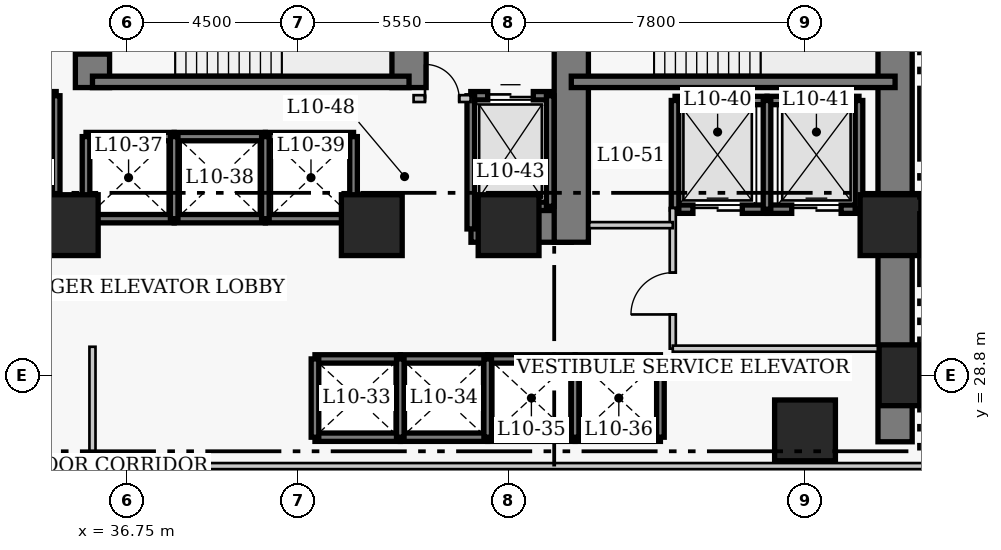
"""IFC4 building model, lengths in metres.
Left out: names, types, materials, properties, quantities, classifications, styles, units other than length and angle.
Written with IfcOpenShell. Run it as: python <this file> out.ifc"""

import sys

from ifc_helpers import new_model, si_unit, direction, frame, frame_2d, origin, origin_2d, place, context, subcontext, project, spatial, rectangle, extrude, element, fill, save


model = new_model("IFC4")
c1 = context("Model", 3, precision=1e-05, world=origin(), true_north=direction((0.0, 1.0)))
c2 = subcontext(c1, "Body", "Model", "MODEL_VIEW")
j1 = project(units=[si_unit("LENGTHUNIT", "METRE"), si_unit("PLANEANGLEUNIT", "RADIAN")], contexts=[c1])
p1 = place(None, origin())
s1 = spatial("IfcSite", under=j1, at=p1, CompositionType="ELEMENT")
p2 = place(p1, origin())
s2 = spatial("IfcBuilding", under=s1, at=p2, CompositionType="ELEMENT")
p3 = place(p2, frame((0.0, 0.0, 45.0)))
s3 = spatial("IfcBuildingStorey", under=s2, at=p3, CompositionType="ELEMENT", Elevation=45.0)
p4 = place(p3, frame((56.97, 27.05, 0.0), z_axis=(0.0, 0.0, 1.0), x_axis=(0.0, 1.0, 0.0)))
e1 = element("IfcWall", 1, at=p4, inside=s3, PredefinedType="SHEAR", context=c2, shape_type="SweptSolid", body=[
    extrude(rectangle(XDim=13.72, YDim=0.9, at=frame_2d((6.86, 0.0))), origin(), (0.0, 0.0, 1.0), 3.8),
])
p5 = place(p3, frame((45.81, 32.75, 0.0), z_axis=(0.0, 0.0, 1.0), x_axis=(1.0, 0.0, 0.0)))
e2 = element("IfcWall", 2, at=p5, inside=s3, PredefinedType="SHEAR", context=c2, shape_type="SweptSolid", body=[
    extrude(rectangle(XDim=2.64, YDim=0.9, at=frame_2d((1.32, 0.0))), origin(), (0.0, 0.0, 1.0), 3.8),
])
p6 = place(p3, frame((35.85, 36.37, 0.0), z_axis=(0.0, 0.0, 1.0), x_axis=(0.0, 1.0, 0.0)))
e3 = element("IfcWall", 3, at=p6, inside=s3, PredefinedType="SHEAR", context=c2, shape_type="SweptSolid", body=[
    extrude(rectangle(XDim=3.95, YDim=0.9, at=frame_2d((1.975, 0.0))), origin(), (0.0, 0.0, 1.0), 3.8),
])
p7 = place(p6, frame((0.88, 0.0, 0.0)))
e4 = element("IfcOpeningElement", 4, at=p7, cuts=e3, PredefinedType="OPENING", context=c2, shape_type="SweptSolid", body=[
    extrude(rectangle(XDim=1.1, YDim=2.15, at=frame_2d((0.55, 1.075))), frame((0.0, 0.46, 0.0), z_axis=(0.0, -1.0, 0.0), x_axis=(1.0, 0.0, 0.0)), (0.0, 0.0, 1.0), 0.92),
])
p8 = place(p3, frame((44.18, 36.37, 0.0), z_axis=(0.0, 0.0, 1.0), x_axis=(0.0, 1.0, 0.0)))
e5 = element("IfcWall", 5, at=p8, inside=s3, PredefinedType="SHEAR", context=c2, shape_type="SweptSolid", body=[
    extrude(rectangle(XDim=3.95, YDim=0.9, at=frame_2d((1.975, 0.0))), origin(), (0.0, 0.0, 1.0), 3.8),
])
p9 = place(p3, frame((48.45, 32.3, 0.0), z_axis=(0.0, 0.0, 1.0), x_axis=(0.0, 1.0, 0.0)))
e6 = element("IfcWall", 6, at=p9, inside=s3, PredefinedType="SHEAR", context=c2, shape_type="SweptSolid", body=[
    extrude(rectangle(XDim=8.02, YDim=0.9, at=frame_2d((4.01, 0.0))), origin(), (0.0, 0.0, 1.0), 3.8),
])
p10 = place(p9, frame((5.9, 0.0, 0.0)))
e7 = element("IfcOpeningElement", 7, at=p10, cuts=e6, PredefinedType="OPENING", context=c2, shape_type="SweptSolid", body=[
    extrude(rectangle(XDim=1.1, YDim=2.15, at=frame_2d((0.55, 1.075))), frame((0.0, 0.46, 0.0), z_axis=(0.0, -1.0, 0.0), x_axis=(1.0, 0.0, 0.0)), (0.0, 0.0, 1.0), 0.92),
])
p11 = place(p3, frame((35.85, 36.52, 0.0), z_axis=(0.0, 0.0, 1.0), x_axis=(1.0, 0.0, 0.0)))
e8 = element("IfcWall", 8, at=p11, inside=s3, PredefinedType="SHEAR", context=c2, shape_type="SweptSolid", body=[
    extrude(rectangle(XDim=8.33, YDim=0.3, at=frame_2d((4.165, 0.0))), origin(), (0.0, 0.0, 1.0), 3.8),
])
p12 = place(p3, frame((48.45, 36.52, 0.0), z_axis=(0.0, 0.0, 1.0), x_axis=(1.0, 0.0, 0.0)))
e9 = element("IfcWall", 9, at=p12, inside=s3, PredefinedType="SHEAR", context=c2, shape_type="SweptSolid", body=[
    extrude(rectangle(XDim=8.52, YDim=0.3, at=frame_2d((4.26, 0.0))), origin(), (0.0, 0.0, 1.0), 3.8),
])
for number, where, z_axis, x_axis in (
    (10, (57.35, 28.8, 0.0), (0.0, 0.0, 1.0), (1.0, 0.0, 0.0)),
    (11, (35.2, 32.75, 0.0), (0.0, 0.0, 1.0), (1.0, 0.0, 0.0)),
    (12, (43.2, 32.75, 0.0), (0.0, 0.0, 1.0), (1.0, 0.0, 0.0)),
    (13, (46.8, 32.75, 0.0), (0.0, 0.0, 1.0), (1.0, 0.0, 0.0)),
    (14, (54.6, 27.35, 0.0), (0.0, 0.0, 1.0), (1.0, 0.0, 0.0)),
    (15, (56.85, 32.75, 0.0), (0.0, 0.0, 1.0), (1.0, 0.0, 0.0)),
):
    element("IfcColumn", number, at=place(p3, frame(where, z_axis=z_axis, x_axis=x_axis)), inside=s3, PredefinedType="COLUMN", context=c2, shape_type="SweptSolid", body=[
        extrude(rectangle(XDim=1.6, YDim=1.6, at=origin_2d()), origin(), (0.0, 0.0, 1.0), 3.8),
    ])
for number, where, z_axis, x_axis in (
    (16, (41.705, 29.23, 0.0), (0.0, 0.0, 1.0), (1.0, 0.0, 0.0)),
    (17, (41.705, 27.17, 0.0), (0.0, 0.0, 1.0), (1.0, 0.0, 0.0)),
):
    element("IfcWall", number, at=place(p3, frame(where, z_axis=z_axis, x_axis=x_axis)), inside=s3, PredefinedType="SHEAR", context=c2, shape_type="SweptSolid", body=[
        extrude(rectangle(XDim=2.245, YDim=0.22, at=frame_2d((1.123, 0.0))), origin(), (0.0, 0.0, 1.0), 3.8),
    ])
p13 = place(p3, frame((41.705, 27.17, 0.0), z_axis=(0.0, 0.0, 1.0), x_axis=(0.0, 1.0, 0.0)))
e18 = element("IfcWall", 18, at=p13, inside=s3, PredefinedType="SHEAR", context=c2, shape_type="SweptSolid", body=[
    extrude(rectangle(XDim=2.06, YDim=0.2, at=frame_2d((1.03, 0.0))), origin(), (0.0, 0.0, 1.0), 3.8),
])
for number, where, z_axis, x_axis in (
    (19, (43.95, 29.23, 0.0), (0.0, 0.0, 1.0), (1.0, 0.0, 0.0)),
    (20, (43.95, 27.17, 0.0), (0.0, 0.0, 1.0), (1.0, 0.0, 0.0)),
):
    element("IfcWall", number, at=place(p3, frame(where, z_axis=z_axis, x_axis=x_axis)), inside=s3, PredefinedType="SHEAR", context=c2, shape_type="SweptSolid", body=[
        extrude(rectangle(XDim=2.3, YDim=0.22, at=frame_2d((1.15, 0.0))), origin(), (0.0, 0.0, 1.0), 3.8),
    ])
p14 = place(p3, frame((43.95, 27.17, 0.0), z_axis=(0.0, 0.0, 1.0), x_axis=(0.0, 1.0, 0.0)))
e21 = element("IfcWall", 21, at=p14, inside=s3, PredefinedType="SHEAR", context=c2, shape_type="SweptSolid", body=[
    extrude(rectangle(XDim=2.06, YDim=0.2, at=frame_2d((1.03, 0.0))), origin(), (0.0, 0.0, 1.0), 3.8),
])
for number, where, z_axis, x_axis in (
    (22, (46.25, 29.23, 0.0), (0.0, 0.0, 1.0), (1.0, 0.0, 0.0)),
    (23, (46.25, 27.17, 0.0), (0.0, 0.0, 1.0), (1.0, 0.0, 0.0)),
):
    element("IfcWall", number, at=place(p3, frame(where, z_axis=z_axis, x_axis=x_axis)), inside=s3, PredefinedType="SHEAR", context=c2, shape_type="SweptSolid", body=[
        extrude(rectangle(XDim=2.3, YDim=0.22, at=frame_2d((1.15, 0.0))), origin(), (0.0, 0.0, 1.0), 3.8),
    ])
p15 = place(p3, frame((46.25, 27.17, 0.0), z_axis=(0.0, 0.0, 1.0), x_axis=(0.0, 1.0, 0.0)))
e24 = element("IfcWall", 24, at=p15, inside=s3, PredefinedType="SHEAR", context=c2, shape_type="SweptSolid", body=[
    extrude(rectangle(XDim=2.06, YDim=0.2, at=frame_2d((1.03, 0.0))), origin(), (0.0, 0.0, 1.0), 3.8),
])
for number, where, z_axis, x_axis in (
    (25, (48.55, 29.23, 0.0), (0.0, 0.0, 1.0), (1.0, 0.0, 0.0)),
    (26, (48.55, 27.17, 0.0), (0.0, 0.0, 1.0), (1.0, 0.0, 0.0)),
):
    element("IfcWall", number, at=place(p3, frame(where, z_axis=z_axis, x_axis=x_axis)), inside=s3, PredefinedType="SHEAR", context=c2, shape_type="SweptSolid", body=[
        extrude(rectangle(XDim=2.245, YDim=0.22, at=frame_2d((1.123, 0.0))), origin(), (0.0, 0.0, 1.0), 3.8),
    ])
for number, where, z_axis, x_axis in (
    (27, (48.55, 27.17, 0.0), (0.0, 0.0, 1.0), (0.0, 1.0, 0.0)),
    (28, (50.795, 27.17, 0.0), (0.0, 0.0, 1.0), (0.0, 1.0, 0.0)),
):
    element("IfcWall", number, at=place(p3, frame(where, z_axis=z_axis, x_axis=x_axis)), inside=s3, PredefinedType="SHEAR", context=c2, shape_type="SweptSolid", body=[
        extrude(rectangle(XDim=2.06, YDim=0.2, at=frame_2d((1.03, 0.0))), origin(), (0.0, 0.0, 1.0), 3.8),
    ])
for number, where, z_axis, x_axis in (
    (29, (35.68, 35.08, 0.0), (0.0, 0.0, 1.0), (1.0, 0.0, 0.0)),
    (30, (35.68, 32.92, 0.0), (0.0, 0.0, 1.0), (1.0, 0.0, 0.0)),
):
    element("IfcWall", number, at=place(p3, frame(where, z_axis=z_axis, x_axis=x_axis)), inside=s3, PredefinedType="SHEAR", context=c2, shape_type="SweptSolid", body=[
        extrude(rectangle(XDim=2.32, YDim=0.22, at=frame_2d((1.16, 0.0))), origin(), (0.0, 0.0, 1.0), 3.8),
    ])
p16 = place(p3, frame((35.68, 32.92, 0.0), z_axis=(0.0, 0.0, 1.0), x_axis=(0.0, 1.0, 0.0)))
e31 = element("IfcWall", 31, at=p16, inside=s3, PredefinedType="SHEAR", context=c2, shape_type="SweptSolid", body=[
    extrude(rectangle(XDim=2.16, YDim=0.2, at=frame_2d((1.08, 0.0))), origin(), (0.0, 0.0, 1.0), 3.8),
])
for number, where, z_axis, x_axis in (
    (32, (38.0, 35.08, 0.0), (0.0, 0.0, 1.0), (1.0, 0.0, 0.0)),
    (33, (38.0, 32.92, 0.0), (0.0, 0.0, 1.0), (1.0, 0.0, 0.0)),
):
    element("IfcWall", number, at=place(p3, frame(where, z_axis=z_axis, x_axis=x_axis)), inside=s3, PredefinedType="SHEAR", context=c2, shape_type="SweptSolid", body=[
        extrude(rectangle(XDim=2.4, YDim=0.22, at=frame_2d((1.2, 0.0))), origin(), (0.0, 0.0, 1.0), 3.8),
    ])
p17 = place(p3, frame((38.0, 32.92, 0.0), z_axis=(0.0, 0.0, 1.0), x_axis=(0.0, 1.0, 0.0)))
e34 = element("IfcWall", 34, at=p17, inside=s3, PredefinedType="SHEAR", context=c2, shape_type="SweptSolid", body=[
    extrude(rectangle(XDim=2.16, YDim=0.2, at=frame_2d((1.08, 0.0))), origin(), (0.0, 0.0, 1.0), 3.8),
])
for number, where, z_axis, x_axis in (
    (35, (40.4, 35.08, 0.0), (0.0, 0.0, 1.0), (1.0, 0.0, 0.0)),
    (36, (40.4, 32.92, 0.0), (0.0, 0.0, 1.0), (1.0, 0.0, 0.0)),
):
    element("IfcWall", number, at=place(p3, frame(where, z_axis=z_axis, x_axis=x_axis)), inside=s3, PredefinedType="SHEAR", context=c2, shape_type="SweptSolid", body=[
        extrude(rectangle(XDim=2.32, YDim=0.22, at=frame_2d((1.16, 0.0))), origin(), (0.0, 0.0, 1.0), 3.8),
    ])
for number, where, z_axis, x_axis in (
    (37, (40.4, 32.92, 0.0), (0.0, 0.0, 1.0), (0.0, 1.0, 0.0)),
    (38, (42.72, 32.92, 0.0), (0.0, 0.0, 1.0), (0.0, 1.0, 0.0)),
):
    element("IfcWall", number, at=place(p3, frame(where, z_axis=z_axis, x_axis=x_axis)), inside=s3, PredefinedType="SHEAR", context=c2, shape_type="SweptSolid", body=[
        extrude(rectangle(XDim=2.16, YDim=0.2, at=frame_2d((1.08, 0.0))), origin(), (0.0, 0.0, 1.0), 3.8),
    ])
p18 = place(p3, frame((51.18, 36.03, 0.0), z_axis=(0.0, 0.0, 1.0), x_axis=(1.0, 0.0, 0.0)))
e39 = element("IfcWall", 39, at=p18, inside=s3, PredefinedType="SHEAR", context=c2, shape_type="SweptSolid", body=[
    extrude(rectangle(XDim=2.42, YDim=0.22, at=frame_2d((1.21, 0.0))), origin(), (0.0, 0.0, 1.0), 3.8),
])
p19 = place(p3, frame((51.18, 33.17, 0.0), z_axis=(0.0, 0.0, 1.0), x_axis=(1.0, 0.0, 0.0)))
e40 = element("IfcWall", 40, at=p19, inside=s3, PredefinedType="SHEAR", context=c2, shape_type="SweptSolid", body=[
    extrude(rectangle(XDim=2.42, YDim=0.22, at=frame_2d((1.21, 0.0))), origin(), (0.0, 0.0, 1.0), 3.8),
])
p20 = place(p19, frame((0.47, 0.0, 0.0)))
e41 = element("IfcOpeningElement", 41, at=p20, cuts=e40, PredefinedType="OPENING", context=c2, shape_type="SweptSolid", body=[
    extrude(rectangle(XDim=1.3, YDim=2.15, at=frame_2d((0.65, 1.075))), frame((0.0, 0.12, 0.0), z_axis=(0.0, -1.0, 0.0), x_axis=(1.0, 0.0, 0.0)), (0.0, 0.0, 1.0), 0.24),
])
p21 = place(p3, frame((51.18, 33.17, 0.0), z_axis=(0.0, 0.0, 1.0), x_axis=(0.0, 1.0, 0.0)))
e42 = element("IfcWall", 42, at=p21, inside=s3, PredefinedType="SHEAR", context=c2, shape_type="SweptSolid", body=[
    extrude(rectangle(XDim=2.86, YDim=0.2, at=frame_2d((1.43, 0.0))), origin(), (0.0, 0.0, 1.0), 3.8),
])
p22 = place(p3, frame((53.6, 36.03, 0.0), z_axis=(0.0, 0.0, 1.0), x_axis=(1.0, 0.0, 0.0)))
e43 = element("IfcWall", 43, at=p22, inside=s3, PredefinedType="SHEAR", context=c2, shape_type="SweptSolid", body=[
    extrude(rectangle(XDim=2.42, YDim=0.22, at=frame_2d((1.21, 0.0))), origin(), (0.0, 0.0, 1.0), 3.8),
])
p23 = place(p3, frame((53.6, 33.17, 0.0), z_axis=(0.0, 0.0, 1.0), x_axis=(1.0, 0.0, 0.0)))
e44 = element("IfcWall", 44, at=p23, inside=s3, PredefinedType="SHEAR", context=c2, shape_type="SweptSolid", body=[
    extrude(rectangle(XDim=2.42, YDim=0.22, at=frame_2d((1.21, 0.0))), origin(), (0.0, 0.0, 1.0), 3.8),
])
p24 = place(p23, frame((0.65, 0.0, 0.0)))
e45 = element("IfcOpeningElement", 45, at=p24, cuts=e44, PredefinedType="OPENING", context=c2, shape_type="SweptSolid", body=[
    extrude(rectangle(XDim=1.3, YDim=2.15, at=frame_2d((0.65, 1.075))), frame((0.0, 0.12, 0.0), z_axis=(0.0, -1.0, 0.0), x_axis=(1.0, 0.0, 0.0)), (0.0, 0.0, 1.0), 0.24),
])
for number, where, z_axis, x_axis in (
    (46, (53.6, 33.17, 0.0), (0.0, 0.0, 1.0), (0.0, 1.0, 0.0)),
    (47, (56.02, 33.17, 0.0), (0.0, 0.0, 1.0), (0.0, 1.0, 0.0)),
):
    element("IfcWall", number, at=place(p3, frame(where, z_axis=z_axis, x_axis=x_axis)), inside=s3, PredefinedType="SHEAR", context=c2, shape_type="SweptSolid", body=[
        extrude(rectangle(XDim=2.86, YDim=0.2, at=frame_2d((1.43, 0.0))), origin(), (0.0, 0.0, 1.0), 3.8),
    ])
p25 = place(p3, frame((32.805, 36.155, 0.0), z_axis=(0.0, 0.0, 1.0), x_axis=(1.0, 0.0, 0.0)))
e48 = element("IfcWall", 48, at=p25, inside=s3, PredefinedType="SHEAR", context=c2, shape_type="SweptSolid", body=[
    extrude(rectangle(XDim=2.09, YDim=0.22, at=frame_2d((1.045, 0.0))), origin(), (0.0, 0.0, 1.0), 3.8),
])
p26 = place(p25, frame((0.445, 0.0, 0.0)))
e49 = element("IfcOpeningElement", 49, at=p26, cuts=e48, PredefinedType="OPENING", context=c2, shape_type="SweptSolid", body=[
    extrude(rectangle(XDim=1.2, YDim=2.15, at=frame_2d((0.6, 1.075))), frame((0.0, 0.12, 0.0), z_axis=(0.0, -1.0, 0.0), x_axis=(1.0, 0.0, 0.0)), (0.0, 0.0, 1.0), 0.24),
])
p27 = place(p3, frame((32.805, 33.245, 0.0), z_axis=(0.0, 0.0, 1.0), x_axis=(1.0, 0.0, 0.0)))
e50 = element("IfcWall", 50, at=p27, inside=s3, PredefinedType="SHEAR", context=c2, shape_type="SweptSolid", body=[
    extrude(rectangle(XDim=2.09, YDim=0.22, at=frame_2d((1.045, 0.0))), origin(), (0.0, 0.0, 1.0), 3.8),
])
p28 = place(p3, frame((34.895, 33.245, 0.0), z_axis=(0.0, 0.0, 1.0), x_axis=(0.0, 1.0, 0.0)))
e51 = element("IfcWall", 51, at=p28, inside=s3, PredefinedType="SHEAR", context=c2, shape_type="SweptSolid", body=[
    extrude(rectangle(XDim=2.91, YDim=0.2, at=frame_2d((1.455, 0.0))), origin(), (0.0, 0.0, 1.0), 3.8),
])
p29 = place(p3, frame((45.805, 36.155, 0.0), z_axis=(0.0, 0.0, 1.0), x_axis=(1.0, 0.0, 0.0)))
e52 = element("IfcWall", 52, at=p29, inside=s3, PredefinedType="SHEAR", context=c2, shape_type="SweptSolid", body=[
    extrude(rectangle(XDim=2.09, YDim=0.22, at=frame_2d((1.045, 0.0))), origin(), (0.0, 0.0, 1.0), 3.8),
])
p30 = place(p29, frame((0.445, 0.0, 0.0)))
e53 = element("IfcOpeningElement", 53, at=p30, cuts=e52, PredefinedType="OPENING", context=c2, shape_type="SweptSolid", body=[
    extrude(rectangle(XDim=1.2, YDim=2.15, at=frame_2d((0.6, 1.075))), frame((0.0, 0.12, 0.0), z_axis=(0.0, -1.0, 0.0), x_axis=(1.0, 0.0, 0.0)), (0.0, 0.0, 1.0), 0.24),
])
p31 = place(p3, frame((45.805, 33.245, 0.0), z_axis=(0.0, 0.0, 1.0), x_axis=(1.0, 0.0, 0.0)))
e54 = element("IfcWall", 54, at=p31, inside=s3, PredefinedType="SHEAR", context=c2, shape_type="SweptSolid", body=[
    extrude(rectangle(XDim=2.09, YDim=0.22, at=frame_2d((1.045, 0.0))), origin(), (0.0, 0.0, 1.0), 3.8),
])
p32 = place(p3, frame((45.805, 32.65, 0.0), z_axis=(0.0, 0.0, 1.0), x_axis=(0.0, 1.0, 0.0)))
e55 = element("IfcWall", 55, at=p32, inside=s3, PredefinedType="SHEAR", context=c2, shape_type="SweptSolid", body=[
    extrude(rectangle(XDim=3.505, YDim=0.2, at=frame_2d((1.752, 0.0))), origin(), (0.0, 0.0, 1.0), 3.8),
])
p33 = place(p3, frame((47.895, 33.245, 0.0), z_axis=(0.0, 0.0, 1.0), x_axis=(0.0, 1.0, 0.0)))
e56 = element("IfcWall", 56, at=p33, inside=s3, PredefinedType="SHEAR", context=c2, shape_type="SweptSolid", body=[
    extrude(rectangle(XDim=2.91, YDim=0.2, at=frame_2d((1.455, 0.0))), origin(), (0.0, 0.0, 1.0), 3.8),
])
p34 = place(p3, frame((44.3, 36.08, 0.0), z_axis=(0.0, 0.0, 1.0), x_axis=(1.0, 0.0, 0.0)))
e57 = element("IfcWall", 57, at=p34, inside=s3, PredefinedType="PARTITIONING", context=c2, shape_type="SweptSolid", body=[
    extrude(rectangle(XDim=1.5, YDim=0.18, at=frame_2d((0.75, 0.0))), origin(), (0.0, 0.0, 1.0), 3.54),
])
p35 = place(p34, frame((0.3, 0.0, 0.0)))
e58 = element("IfcOpeningElement", 58, at=p35, cuts=e57, PredefinedType="OPENING", context=c2, shape_type="SweptSolid", body=[
    extrude(rectangle(XDim=0.9, YDim=2.15, at=frame_2d((0.45, 1.075))), frame((0.0, 0.1, 0.0), z_axis=(0.0, -1.0, 0.0), x_axis=(1.0, 0.0, 0.0)), (0.0, 0.0, 1.0), 0.2),
])
p36 = place(p3, frame((51.12, 29.5, 0.0), z_axis=(0.0, 0.0, 1.0), x_axis=(0.0, 1.0, 0.0)))
e59 = element("IfcWall", 59, at=p36, inside=s3, PredefinedType="PARTITIONING", context=c2, shape_type="SweptSolid", body=[
    extrude(rectangle(XDim=3.7, YDim=0.16, at=frame_2d((1.85, 0.0))), origin(), (0.0, 0.0, 1.0), 3.54),
])
p37 = place(p36, frame((0.9, 0.0, 0.0)))
e60 = element("IfcOpeningElement", 60, at=p37, cuts=e59, PredefinedType="OPENING", context=c2, shape_type="SweptSolid", body=[
    extrude(rectangle(XDim=1.1, YDim=2.15, at=frame_2d((0.55, 1.075))), frame((0.0, 0.09, 0.0), z_axis=(0.0, -1.0, 0.0), x_axis=(1.0, 0.0, 0.0)), (0.0, 0.0, 1.0), 0.18),
])
p38 = place(p3, frame((51.12, 29.5, 0.0), z_axis=(0.0, 0.0, 1.0), x_axis=(1.0, 0.0, 0.0)))
e61 = element("IfcWall", 61, at=p38, inside=s3, PredefinedType="PARTITIONING", context=c2, shape_type="SweptSolid", body=[
    extrude(rectangle(XDim=5.63, YDim=0.16, at=frame_2d((2.815, 0.0))), origin(), (0.0, 0.0, 1.0), 3.54),
])
p39 = place(p3, frame((48.92, 32.75, 0.0), z_axis=(0.0, 0.0, 1.0), x_axis=(1.0, 0.0, 0.0)))
e62 = element("IfcWall", 62, at=p39, inside=s3, PredefinedType="PARTITIONING", context=c2, shape_type="SweptSolid", body=[
    extrude(rectangle(XDim=2.2, YDim=0.16, at=frame_2d((1.1, 0.0))), origin(), (0.0, 0.0, 1.0), 3.54),
])
p40 = place(p3, frame((35.85, 26.41, 0.0), z_axis=(0.0, 0.0, 1.0), x_axis=(1.0, 0.0, 0.0)))
e63 = element("IfcWall", 63, at=p40, inside=s3, PredefinedType="PARTITIONING", context=c2, shape_type="SweptSolid", body=[
    extrude(rectangle(XDim=22.8, YDim=0.16, at=frame_2d((11.4, 0.0))), origin(), (0.0, 0.0, 1.0), 3.54),
])
p41 = place(p3, frame((35.85, 26.41, 0.0), z_axis=(0.0, 0.0, 1.0), x_axis=(0.0, 1.0, 0.0)))
e64 = element("IfcWall", 64, at=p41, inside=s3, PredefinedType="PARTITIONING", context=c2, shape_type="SweptSolid", body=[
    extrude(rectangle(XDim=3.14, YDim=0.16, at=frame_2d((1.57, 0.0))), origin(), (0.0, 0.0, 1.0), 3.54),
])
p42 = place(p20, origin())
e65 = element("IfcDoor", 65, at=p42, inside=s3, OperationType="DOUBLE_DOOR_SLIDING", PredefinedType="DOOR", context=c2, shape_type="SweptSolid", body=[
    extrude(rectangle(XDim=1.3, YDim=2.15, at=frame_2d((0.65, 1.075))), frame((0.0, 0.025, 0.0), z_axis=(0.0, -1.0, 0.0), x_axis=(1.0, 0.0, 0.0)), (0.0, 0.0, 1.0), 0.05),
])
fill(e41, e65)
p43 = place(p24, origin())
e66 = element("IfcDoor", 66, at=p43, inside=s3, OperationType="DOUBLE_DOOR_SLIDING", PredefinedType="DOOR", context=c2, shape_type="SweptSolid", body=[
    extrude(rectangle(XDim=1.3, YDim=2.15, at=frame_2d((0.65, 1.075))), frame((0.0, 0.025, 0.0), z_axis=(0.0, -1.0, 0.0), x_axis=(1.0, 0.0, 0.0)), (0.0, 0.0, 1.0), 0.05),
])
fill(e45, e66)
p44 = place(p30, origin())
e67 = element("IfcDoor", 67, at=p44, inside=s3, OperationType="DOUBLE_DOOR_SLIDING", PredefinedType="DOOR", context=c2, shape_type="SweptSolid", body=[
    extrude(rectangle(XDim=1.2, YDim=2.15, at=frame_2d((0.6, 1.075))), frame((0.0, 0.025, 0.0), z_axis=(0.0, -1.0, 0.0), x_axis=(1.0, 0.0, 0.0)), (0.0, 0.0, 1.0), 0.05),
])
fill(e53, e67)
p45 = place(p35, origin())
e68 = element("IfcDoor", 68, at=p45, inside=s3, OperationType="SINGLE_SWING_LEFT", PredefinedType="DOOR", context=c2, shape_type="SweptSolid", body=[
    extrude(rectangle(XDim=0.9, YDim=2.15, at=frame_2d((0.45, 1.075))), frame((0.0, 0.025, 0.0), z_axis=(0.0, -1.0, 0.0), x_axis=(1.0, 0.0, 0.0)), (0.0, 0.0, 1.0), 0.05),
])
fill(e58, e68)
p46 = place(p37, origin())
e69 = element("IfcDoor", 69, at=p46, inside=s3, OperationType="SINGLE_SWING_LEFT", PredefinedType="DOOR", context=c2, shape_type="SweptSolid", body=[
    extrude(rectangle(XDim=1.1, YDim=2.15, at=frame_2d((0.55, 1.075))), frame((0.0, 0.025, 0.0), z_axis=(0.0, -1.0, 0.0), x_axis=(1.0, 0.0, 0.0)), (0.0, 0.0, 1.0), 0.05),
])
fill(e60, e69)
p47 = place(p7, origin())
e70 = element("IfcDoor", 70, at=p47, inside=s3, OperationType="SINGLE_SWING_RIGHT", PredefinedType="DOOR", context=c2, shape_type="SweptSolid", body=[
    extrude(rectangle(XDim=1.1, YDim=2.15, at=frame_2d((0.55, 1.075))), frame((0.0, 0.025, 0.0), z_axis=(0.0, -1.0, 0.0), x_axis=(1.0, 0.0, 0.0)), (0.0, 0.0, 1.0), 0.05),
])
fill(e4, e70)
save(model, sys.argv[1])
